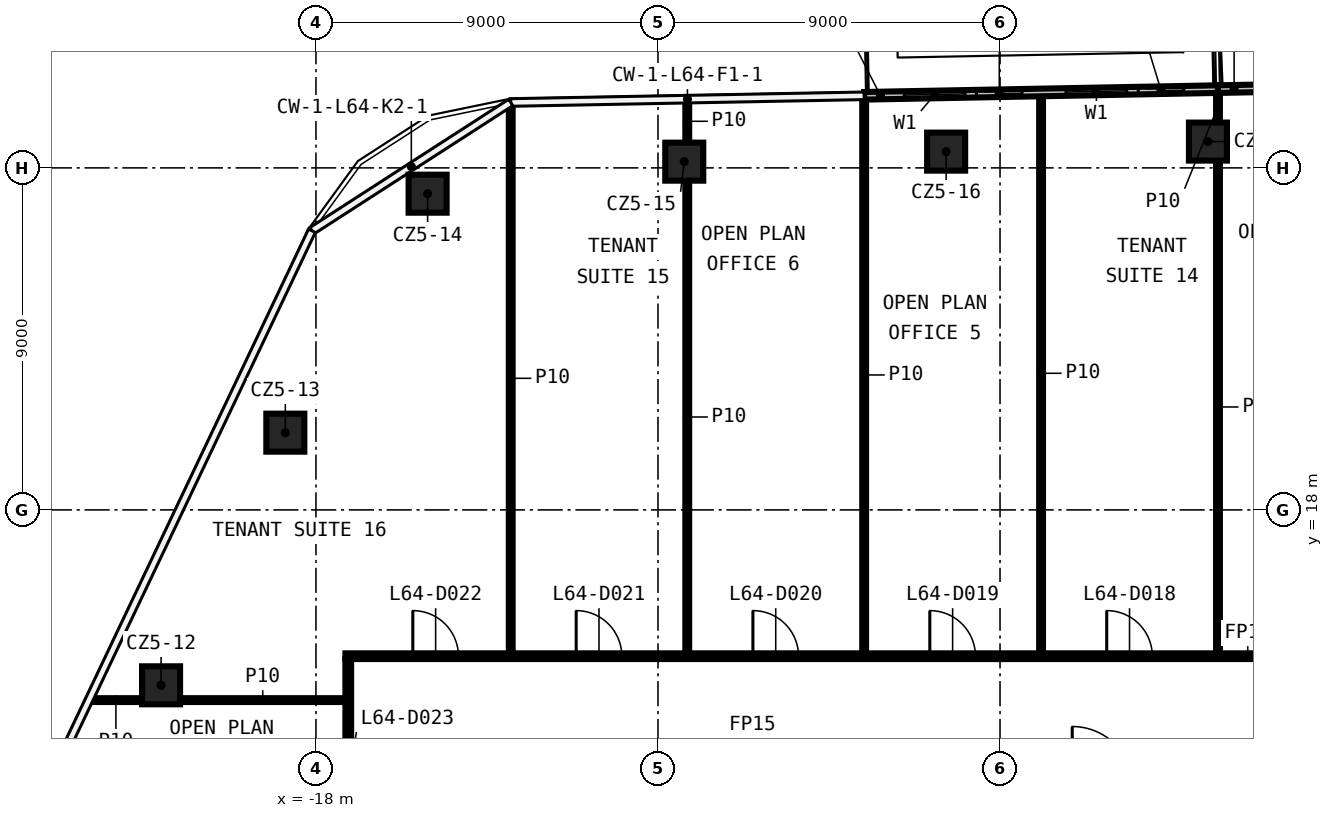
"""IFC4 building model, lengths in metres.
Left out: names, types, materials, properties, quantities, classifications, styles, units other than length and angle.
Written with IfcOpenShell. Run it as: python <this file> out.ifc"""

import sys

from ifc_helpers import new_model, si_unit, direction, frame, frame_2d, origin, origin_2d, place, context, subcontext, project, spatial, rectangle, extrude, element, fill, save


model = new_model("IFC4")
c1 = context("Model", 3, precision=1e-05, world=origin(), true_north=direction((0.0, 1.0)))
c2 = subcontext(c1, "Body", "Model", "MODEL_VIEW")
j1 = project(units=[si_unit("LENGTHUNIT", "METRE"), si_unit("PLANEANGLEUNIT", "RADIAN")], contexts=[c1])
p1 = place(None, origin())
s1 = spatial("IfcSite", under=j1, at=p1, CompositionType="ELEMENT")
p2 = place(p1, origin())
s2 = spatial("IfcBuilding", under=s1, at=p2, CompositionType="ELEMENT")
p3 = place(p2, frame((0.0, 0.0, 302.6)))
s3 = spatial("IfcBuildingStorey", under=s2, at=p3, CompositionType="ELEMENT", Elevation=302.6)
for number, where, z_axis, x_axis in (
    (1, (-22.076, 13.384, 0.0), (0.0, 0.0, 1.0), (1.0, 0.0, 0.0)),
    (2, (-18.806, 20.032, 0.0), (0.0, 0.0, 1.0), (1.0, 0.0, 0.0)),
    (3, (-15.062, 26.321, 0.0), (0.0, 0.0, 1.0), (1.0, 0.0, 0.0)),
    (4, (-8.309, 27.164, 0.0), (0.0, 0.0, 1.0), (1.0, 0.0, 0.0)),
    (5, (-1.418, 27.428, 0.0), (0.0, 0.0, 1.0), (1.0, 0.0, 0.0)),
    (6, (5.471, 27.692, 0.0), (0.0, 0.0, 1.0), (1.0, 0.0, 0.0)),
):
    element("IfcColumn", number, at=place(p3, frame(where, z_axis=z_axis, x_axis=x_axis)), inside=s3, PredefinedType="COLUMN", context=c2, shape_type="SweptSolid", body=[
        extrude(rectangle(XDim=1.0, YDim=1.0, at=origin_2d()), origin(), (0.0, 0.0, 1.0), 3.82),
    ])
p4 = place(p3, frame((-23.952, 12.995, 0.0), z_axis=(0.0, 0.0, 1.0), x_axis=(1.0, 0.0, 0.0)))
e7 = element("IfcWall", 7, at=p4, inside=s3, PredefinedType="PARTITIONING", context=c2, shape_type="SweptSolid", body=[
    extrude(rectangle(XDim=1.376, YDim=0.1, at=frame_2d((0.688, 0.0))), origin(), (0.0, 0.0, 1.0), 3.82),
])
p5 = place(p3, frame((-21.576, 12.995, 0.0), z_axis=(0.0, 0.0, 1.0), x_axis=(1.0, 0.0, 0.0)))
e8 = element("IfcWall", 8, at=p5, inside=s3, PredefinedType="PARTITIONING", context=c2, shape_type="SweptSolid", body=[
    extrude(rectangle(XDim=4.351, YDim=0.1, at=frame_2d((2.175, 0.0))), origin(), (0.0, 0.0, 1.0), 3.82),
])
p6 = place(p3, frame((-17.225, 14.15, 0.0), z_axis=(0.0, 0.0, 1.0), x_axis=(1.0, 0.0, 0.0)))
e9 = element("IfcWall", 9, at=p6, inside=s3, PredefinedType="PARTITIONING", context=c2, shape_type="SweptSolid", body=[
    extrude(rectangle(XDim=34.45, YDim=0.15, at=frame_2d((17.225, 0.0))), origin(), (0.0, 0.0, 1.0), 3.82),
])
p7 = place(p6, frame((31.962, 0.0, 0.0)))
e10 = element("IfcOpeningElement", 10, at=p7, cuts=e9, PredefinedType="OPENING", context=c2, shape_type="SweptSolid", body=[
    extrude(rectangle(XDim=1.2, YDim=2.1, at=frame_2d((0.6, 1.05))), frame((0.0, 0.085, 0.0), z_axis=(0.0, -1.0, 0.0), x_axis=(1.0, 0.0, 0.0)), (0.0, 0.0, 1.0), 0.17),
])
p8 = place(p6, frame((26.254, 0.0, 0.0)))
e11 = element("IfcOpeningElement", 11, at=p8, cuts=e9, PredefinedType="OPENING", context=c2, shape_type="SweptSolid", body=[
    extrude(rectangle(XDim=1.2, YDim=2.1, at=frame_2d((0.6, 1.05))), frame((0.0, 0.085, 0.0), z_axis=(0.0, -1.0, 0.0), x_axis=(1.0, 0.0, 0.0)), (0.0, 0.0, 1.0), 0.17),
])
p9 = place(p6, frame((20.032, 0.0, 0.0)))
e12 = element("IfcOpeningElement", 12, at=p9, cuts=e9, PredefinedType="OPENING", context=c2, shape_type="SweptSolid", body=[
    extrude(rectangle(XDim=1.2, YDim=2.1, at=frame_2d((0.6, 1.05))), frame((0.0, 0.085, 0.0), z_axis=(0.0, -1.0, 0.0), x_axis=(1.0, 0.0, 0.0)), (0.0, 0.0, 1.0), 0.17),
])
p10 = place(p6, frame((15.378, 0.0, 0.0)))
e13 = element("IfcOpeningElement", 13, at=p10, cuts=e9, PredefinedType="OPENING", context=c2, shape_type="SweptSolid", body=[
    extrude(rectangle(XDim=1.2, YDim=2.1, at=frame_2d((0.6, 1.05))), frame((0.0, 0.085, 0.0), z_axis=(0.0, -1.0, 0.0), x_axis=(1.0, 0.0, 0.0)), (0.0, 0.0, 1.0), 0.17),
])
p11 = place(p6, frame((10.723, 0.0, 0.0)))
e14 = element("IfcOpeningElement", 14, at=p11, cuts=e9, PredefinedType="OPENING", context=c2, shape_type="SweptSolid", body=[
    extrude(rectangle(XDim=1.2, YDim=2.1, at=frame_2d((0.6, 1.05))), frame((0.0, 0.085, 0.0), z_axis=(0.0, -1.0, 0.0), x_axis=(1.0, 0.0, 0.0)), (0.0, 0.0, 1.0), 0.17),
])
p12 = place(p6, frame((6.073, 0.0, 0.0)))
e15 = element("IfcOpeningElement", 15, at=p12, cuts=e9, PredefinedType="OPENING", context=c2, shape_type="SweptSolid", body=[
    extrude(rectangle(XDim=1.2, YDim=2.1, at=frame_2d((0.6, 1.05))), frame((0.0, 0.085, 0.0), z_axis=(0.0, -1.0, 0.0), x_axis=(1.0, 0.0, 0.0)), (0.0, 0.0, 1.0), 0.17),
])
p13 = place(p6, frame((1.774, 0.0, 0.0)))
e16 = element("IfcOpeningElement", 16, at=p13, cuts=e9, PredefinedType="OPENING", context=c2, shape_type="SweptSolid", body=[
    extrude(rectangle(XDim=1.2, YDim=2.1, at=frame_2d((0.6, 1.05))), frame((0.0, 0.085, 0.0), z_axis=(0.0, -1.0, 0.0), x_axis=(1.0, 0.0, 0.0)), (0.0, 0.0, 1.0), 0.17),
])
p14 = place(p3, frame((5.735, 14.225, 0.0), z_axis=(0.0, 0.0, 1.0), x_axis=(0.0, 1.0, 0.0)))
e17 = element("IfcWall", 17, at=p14, inside=s3, PredefinedType="PARTITIONING", context=c2, shape_type="SweptSolid", body=[
    extrude(rectangle(XDim=12.967, YDim=0.1, at=frame_2d((6.483, 0.0))), origin(), (0.0, 0.0, 1.0), 3.82),
])
p15 = place(p3, frame((5.735, 28.192, 0.0), z_axis=(0.0, 0.0, 1.0), x_axis=(0.0, 1.0, 0.0)))
e18 = element("IfcWall", 18, at=p15, inside=s3, PredefinedType="PARTITIONING", context=c2, shape_type="SweptSolid", body=[
    extrude(rectangle(XDim=0.861, YDim=0.1, at=frame_2d((0.43, 0.0))), origin(), (0.0, 0.0, 1.0), 3.82),
])
p16 = place(p3, frame((1.08, 14.225, 0.0), z_axis=(0.0, 0.0, 1.0), x_axis=(0.0, 1.0, 0.0)))
e19 = element("IfcWall", 19, at=p16, inside=s3, PredefinedType="PARTITIONING", context=c2, shape_type="SweptSolid", body=[
    extrude(rectangle(XDim=14.74, YDim=0.1, at=frame_2d((7.37, 0.0))), origin(), (0.0, 0.0, 1.0), 3.82),
])
p17 = place(p3, frame((-3.575, 14.225, 0.0), z_axis=(0.0, 0.0, 1.0), x_axis=(0.0, 1.0, 0.0)))
e20 = element("IfcWall", 20, at=p17, inside=s3, PredefinedType="PARTITIONING", context=c2, shape_type="SweptSolid", body=[
    extrude(rectangle(XDim=14.652, YDim=0.1, at=frame_2d((7.326, 0.0))), origin(), (0.0, 0.0, 1.0), 3.82),
])
p18 = place(p3, frame((-8.23, 14.225, 0.0), z_axis=(0.0, 0.0, 1.0), x_axis=(0.0, 1.0, 0.0)))
e21 = element("IfcWall", 21, at=p18, inside=s3, PredefinedType="PARTITIONING", context=c2, shape_type="SweptSolid", body=[
    extrude(rectangle(XDim=12.439, YDim=0.1, at=frame_2d((6.219, 0.0))), origin(), (0.0, 0.0, 1.0), 3.82),
])
p19 = place(p3, frame((-8.23, 27.664, 0.0), z_axis=(0.0, 0.0, 1.0), x_axis=(0.0, 1.0, 0.0)))
e22 = element("IfcWall", 22, at=p19, inside=s3, PredefinedType="PARTITIONING", context=c2, shape_type="SweptSolid", body=[
    extrude(rectangle(XDim=1.125, YDim=0.1, at=frame_2d((0.562, 0.0))), origin(), (0.0, 0.0, 1.0), 3.82),
])
p20 = place(p3, frame((-12.875, 14.225, 0.0), z_axis=(0.0, 0.0, 1.0), x_axis=(0.0, 1.0, 0.0)))
e23 = element("IfcWall", 23, at=p20, inside=s3, PredefinedType="PARTITIONING", context=c2, shape_type="SweptSolid", body=[
    extrude(rectangle(XDim=14.475, YDim=0.1, at=frame_2d((7.238, 0.0))), origin(), (0.0, 0.0, 1.0), 3.82),
])
p21 = place(p3, frame((-17.15, -14.075, 0.0), z_axis=(0.0, 0.0, 1.0), x_axis=(0.0, 1.0, 0.0)))
e24 = element("IfcWall", 24, at=p21, inside=s3, PredefinedType="PARTITIONING", context=c2, shape_type="SweptSolid", body=[
    extrude(rectangle(XDim=28.15, YDim=0.15, at=frame_2d((14.075, 0.0))), origin(), (0.0, 0.0, 1.0), 3.82),
])
p22 = place(p21, frame((11.151, 0.0, 0.0)))
e25 = element("IfcOpeningElement", 25, at=p22, cuts=e24, PredefinedType="OPENING", context=c2, shape_type="SweptSolid", body=[
    extrude(rectangle(XDim=1.2, YDim=2.1, at=frame_2d((0.6, 1.05))), frame((0.0, 0.085, 0.0), z_axis=(0.0, -1.0, 0.0), x_axis=(1.0, 0.0, 0.0)), (0.0, 0.0, 1.0), 0.17),
])
p23 = place(p21, frame((5.555, 0.0, 0.0)))
e26 = element("IfcOpeningElement", 26, at=p23, cuts=e24, PredefinedType="OPENING", context=c2, shape_type="SweptSolid", body=[
    extrude(rectangle(XDim=1.2, YDim=2.1, at=frame_2d((0.6, 1.05))), frame((0.0, 0.085, 0.0), z_axis=(0.0, -1.0, 0.0), x_axis=(1.0, 0.0, 0.0)), (0.0, 0.0, 1.0), 0.17),
])
p24 = place(p21, frame((1.7, 0.0, 0.0)))
e27 = element("IfcOpeningElement", 27, at=p24, cuts=e24, PredefinedType="OPENING", context=c2, shape_type="SweptSolid", body=[
    extrude(rectangle(XDim=1.2, YDim=2.1, at=frame_2d((0.6, 1.05))), frame((0.0, 0.085, 0.0), z_axis=(0.0, -1.0, 0.0), x_axis=(1.0, 0.0, 0.0)), (0.0, 0.0, 1.0), 0.17),
])
p25 = place(p21, frame((24.41, 0.0, 0.0)))
e28 = element("IfcOpeningElement", 28, at=p25, cuts=e24, PredefinedType="OPENING", context=c2, shape_type="SweptSolid", body=[
    extrude(rectangle(XDim=1.2, YDim=2.1, at=frame_2d((0.6, 1.05))), frame((0.0, 0.085, 0.0), z_axis=(0.0, -1.0, 0.0), x_axis=(1.0, 0.0, 0.0)), (0.0, 0.0, 1.0), 0.17),
])
p26 = place(p21, frame((20.29, 0.0, 0.0)))
e29 = element("IfcOpeningElement", 29, at=p26, cuts=e24, PredefinedType="OPENING", context=c2, shape_type="SweptSolid", body=[
    extrude(rectangle(XDim=1.2, YDim=2.1, at=frame_2d((0.6, 1.05))), frame((0.0, 0.085, 0.0), z_axis=(0.0, -1.0, 0.0), x_axis=(1.0, 0.0, 0.0)), (0.0, 0.0, 1.0), 0.17),
])
p27 = place(p21, frame((16.17, 0.0, 0.0)))
e30 = element("IfcOpeningElement", 30, at=p27, cuts=e24, PredefinedType="OPENING", context=c2, shape_type="SweptSolid", body=[
    extrude(rectangle(XDim=1.2, YDim=2.1, at=frame_2d((0.6, 1.05))), frame((0.0, 0.085, 0.0), z_axis=(0.0, -1.0, 0.0), x_axis=(1.0, 0.0, 0.0)), (0.0, 0.0, 1.0), 0.17),
])
p28 = place(p3, frame((5.735, 29.073, 0.0), z_axis=(0.0, 0.0, 1.0), x_axis=(-0.999821300983, -0.01890412918, 0.0)))
e31 = element("IfcWall", 31, at=p28, inside=s3, PredefinedType="SOLIDWALL", context=c2, shape_type="SweptSolid", body=[
    extrude(rectangle(XDim=9.312, YDim=0.2, at=frame_2d((4.656, 0.0))), origin(), (0.0, 0.0, 1.0), 3.82),
])
p29 = place(p28, frame((2.4, 0.0, 0.6)))
e32 = element("IfcOpeningElement", 32, at=p29, cuts=e31, PredefinedType="OPENING", context=c2, shape_type="SweptSolid", body=[
    extrude(rectangle(XDim=1.6, YDim=2.4, at=frame_2d((0.8, 1.2))), frame((0.0, 0.11, 0.0), z_axis=(0.0, -1.0, 0.0), x_axis=(1.0, 0.0, 0.0)), (0.0, 0.0, 1.0), 0.22),
])
p30 = place(p28, frame((0.9, 0.0, 0.0)))
e33 = element("IfcOpeningElement", 33, at=p30, cuts=e31, PredefinedType="OPENING", context=c2, shape_type="SweptSolid", body=[
    extrude(rectangle(XDim=1.2, YDim=2.4, at=frame_2d((0.6, 1.2))), frame((0.0, 0.11, 0.0), z_axis=(0.0, -1.0, 0.0), x_axis=(1.0, 0.0, 0.0)), (0.0, 0.0, 1.0), 0.22),
])
p31 = place(p28, frame((6.656, 0.0, 0.6)))
e34 = element("IfcOpeningElement", 34, at=p31, cuts=e31, PredefinedType="OPENING", context=c2, shape_type="SweptSolid", body=[
    extrude(rectangle(XDim=1.6, YDim=2.4, at=frame_2d((0.8, 1.2))), frame((0.0, 0.11, 0.0), z_axis=(0.0, -1.0, 0.0), x_axis=(1.0, 0.0, 0.0)), (0.0, 0.0, 1.0), 0.22),
])
p32 = place(p28, frame((5.156, 0.0, 0.0)))
e35 = element("IfcOpeningElement", 35, at=p32, cuts=e31, PredefinedType="OPENING", context=c2, shape_type="SweptSolid", body=[
    extrude(rectangle(XDim=1.2, YDim=2.4, at=frame_2d((0.6, 1.2))), frame((0.0, 0.11, 0.0), z_axis=(0.0, -1.0, 0.0), x_axis=(1.0, 0.0, 0.0)), (0.0, 0.0, 1.0), 0.22),
])
p33 = place(p3, frame((10.383, 29.161, 0.0), z_axis=(0.0, 0.0, 1.0), x_axis=(-0.999821262404, -0.018906169475, 0.0)))
e36 = element("IfcWall", 36, at=p33, inside=s3, PredefinedType="SOLIDWALL", context=c2, shape_type="SweptSolid", body=[
    extrude(rectangle(XDim=4.649, YDim=0.2, at=frame_2d((2.324, 0.0))), origin(), (0.0, 0.0, 1.0), 3.82),
])
p34 = place(p33, frame((2.0, 0.0, 0.6)))
e37 = element("IfcOpeningElement", 37, at=p34, cuts=e36, PredefinedType="OPENING", context=c2, shape_type="SweptSolid", body=[
    extrude(rectangle(XDim=1.6, YDim=2.4, at=frame_2d((0.8, 1.2))), frame((0.0, 0.11, 0.0), z_axis=(0.0, -1.0, 0.0), x_axis=(1.0, 0.0, 0.0)), (0.0, 0.0, 1.0), 0.22),
])
p35 = place(p33, frame((0.5, 0.0, 0.0)))
e38 = element("IfcOpeningElement", 38, at=p35, cuts=e36, PredefinedType="OPENING", context=c2, shape_type="SweptSolid", body=[
    extrude(rectangle(XDim=1.2, YDim=2.4, at=frame_2d((0.6, 1.2))), frame((0.0, 0.11, 0.0), z_axis=(0.0, -1.0, 0.0), x_axis=(1.0, 0.0, 0.0)), (0.0, 0.0, 1.0), 0.22),
])
p36 = place(p9, origin())
e39 = element("IfcDoor", 39, at=p36, inside=s3, OperationType="SINGLE_SWING_LEFT", PredefinedType="DOOR", context=c2, shape_type="SweptSolid", body=[
    extrude(rectangle(XDim=1.2, YDim=2.1, at=frame_2d((0.6, 1.05))), frame((0.0, 0.025, 0.0), z_axis=(0.0, -1.0, 0.0), x_axis=(1.0, 0.0, 0.0)), (0.0, 0.0, 1.0), 0.05),
])
fill(e12, e39)
p37 = place(p10, origin())
e40 = element("IfcDoor", 40, at=p37, inside=s3, OperationType="SINGLE_SWING_RIGHT", PredefinedType="DOOR", context=c2, shape_type="SweptSolid", body=[
    extrude(rectangle(XDim=1.2, YDim=2.1, at=frame_2d((0.6, 1.05))), frame((0.0, 0.025, 0.0), z_axis=(0.0, -1.0, 0.0), x_axis=(1.0, 0.0, 0.0)), (0.0, 0.0, 1.0), 0.05),
])
fill(e13, e40)
p38 = place(p11, origin())
e41 = element("IfcDoor", 41, at=p38, inside=s3, OperationType="SINGLE_SWING_LEFT", PredefinedType="DOOR", context=c2, shape_type="SweptSolid", body=[
    extrude(rectangle(XDim=1.2, YDim=2.1, at=frame_2d((0.6, 1.05))), frame((0.0, 0.025, 0.0), z_axis=(0.0, -1.0, 0.0), x_axis=(1.0, 0.0, 0.0)), (0.0, 0.0, 1.0), 0.05),
])
fill(e14, e41)
p39 = place(p12, origin())
e42 = element("IfcDoor", 42, at=p39, inside=s3, OperationType="SINGLE_SWING_RIGHT", PredefinedType="DOOR", context=c2, shape_type="SweptSolid", body=[
    extrude(rectangle(XDim=1.2, YDim=2.1, at=frame_2d((0.6, 1.05))), frame((0.0, 0.025, 0.0), z_axis=(0.0, -1.0, 0.0), x_axis=(1.0, 0.0, 0.0)), (0.0, 0.0, 1.0), 0.05),
])
fill(e15, e42)
p40 = place(p13, origin())
e43 = element("IfcDoor", 43, at=p40, inside=s3, OperationType="SINGLE_SWING_LEFT", PredefinedType="DOOR", context=c2, shape_type="SweptSolid", body=[
    extrude(rectangle(XDim=1.2, YDim=2.1, at=frame_2d((0.6, 1.05))), frame((0.0, 0.025, 0.0), z_axis=(0.0, -1.0, 0.0), x_axis=(1.0, 0.0, 0.0)), (0.0, 0.0, 1.0), 0.05),
])
fill(e16, e43)
p41 = place(p29, origin())
e44 = element("IfcWindow", 44, at=p41, inside=s3, PartitioningType="SINGLE_PANEL", PredefinedType="WINDOW", context=c2, shape_type="SweptSolid", body=[
    extrude(rectangle(XDim=1.6, YDim=2.4, at=frame_2d((0.8, 1.2))), frame((0.0, 0.03, 0.0), z_axis=(0.0, -1.0, 0.0), x_axis=(1.0, 0.0, 0.0)), (0.0, 0.0, 1.0), 0.06),
])
fill(e32, e44)
p42 = place(p30, origin())
e45 = element("IfcDoor", 45, at=p42, inside=s3, OperationType="SLIDING_TO_LEFT", PredefinedType="DOOR", context=c2, shape_type="SweptSolid", body=[
    extrude(rectangle(XDim=1.2, YDim=2.4, at=frame_2d((0.6, 1.2))), frame((0.0, 0.025, 0.0), z_axis=(0.0, -1.0, 0.0), x_axis=(1.0, 0.0, 0.0)), (0.0, 0.0, 1.0), 0.05),
])
fill(e33, e45)
p43 = place(p31, origin())
e46 = element("IfcWindow", 46, at=p43, inside=s3, PartitioningType="SINGLE_PANEL", PredefinedType="WINDOW", context=c2, shape_type="SweptSolid", body=[
    extrude(rectangle(XDim=1.6, YDim=2.4, at=frame_2d((0.8, 1.2))), frame((0.0, 0.03, 0.0), z_axis=(0.0, -1.0, 0.0), x_axis=(1.0, 0.0, 0.0)), (0.0, 0.0, 1.0), 0.06),
])
fill(e34, e46)
p44 = place(p32, origin())
e47 = element("IfcDoor", 47, at=p44, inside=s3, OperationType="SLIDING_TO_LEFT", PredefinedType="DOOR", context=c2, shape_type="SweptSolid", body=[
    extrude(rectangle(XDim=1.2, YDim=2.4, at=frame_2d((0.6, 1.2))), frame((0.0, 0.025, 0.0), z_axis=(0.0, -1.0, 0.0), x_axis=(1.0, 0.0, 0.0)), (0.0, 0.0, 1.0), 0.05),
])
fill(e35, e47)
save(model, sys.argv[1])
